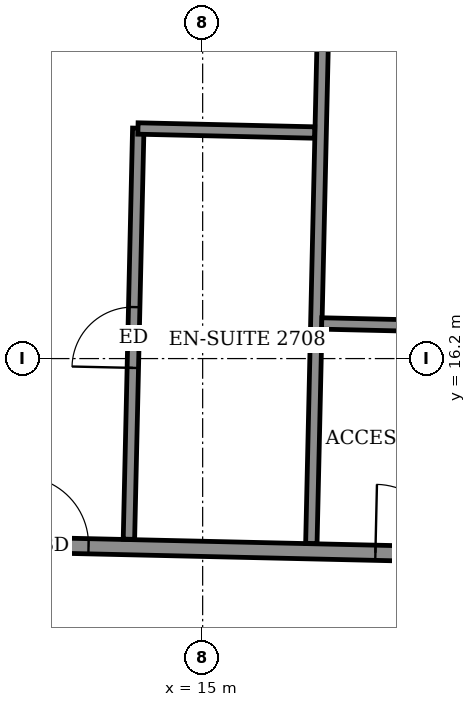
"""IFC4 building model, lengths in metres.
Left out: names, types, materials, properties, quantities, classifications, styles, units other than length and angle.
Written with IfcOpenShell. Run it as: python <this file> out.ifc"""

import sys

from ifc_helpers import new_model, si_unit, direction, frame, frame_2d, origin, place, context, subcontext, project, spatial, rectangle, extrude, element, fill, save


model = new_model("IFC4")
c1 = context("Model", 3, precision=1e-05, world=origin(), true_north=direction((0.0, 1.0)))
c2 = subcontext(c1, "Body", "Model", "MODEL_VIEW")
j1 = project(units=[si_unit("LENGTHUNIT", "METRE"), si_unit("PLANEANGLEUNIT", "RADIAN")], contexts=[c1])
p1 = place(None, origin())
s1 = spatial("IfcSite", under=j1, at=p1, CompositionType="ELEMENT")
p2 = place(p1, origin())
s2 = spatial("IfcBuilding", under=s1, at=p2, CompositionType="ELEMENT")
p3 = place(p2, frame((0.0, 0.0, 109.1)))
s3 = spatial("IfcBuildingStorey", under=s2, at=p3, CompositionType="ELEMENT", Elevation=109.1)
p4 = place(p3, frame((-26.316, 14.634, 0.0), z_axis=(0.0, 0.0, 1.0), x_axis=(0.999742734556, -0.02268181435, 0.0)))
e1 = element("IfcWall", 1, at=p4, inside=s3, PredefinedType="PARTITIONING", context=c2, shape_type="SweptSolid", body=[
    extrude(rectangle(XDim=50.708, YDim=0.2, at=frame_2d((25.354, 0.0))), origin(), (0.0, 0.0, 1.0), 3.05),
])
p5 = place(p4, frame((48.229, 0.0, 0.0)))
e2 = element("IfcOpeningElement", 2, at=p5, cuts=e1, PredefinedType="OPENING", context=c2, shape_type="SweptSolid", body=[
    extrude(rectangle(XDim=1.0, YDim=2.1, at=frame_2d((0.5, 1.05))), frame((0.0, 0.11, 0.0), z_axis=(0.0, -1.0, 0.0), x_axis=(1.0, 0.0, 0.0)), (0.0, 0.0, 1.0), 0.22),
])
p6 = place(p4, frame((43.6, 0.0, 0.0)))
e3 = element("IfcOpeningElement", 3, at=p6, cuts=e1, PredefinedType="OPENING", context=c2, shape_type="SweptSolid", body=[
    extrude(rectangle(XDim=0.9, YDim=2.1, at=frame_2d((0.45, 1.05))), frame((0.0, 0.11, 0.0), z_axis=(0.0, -1.0, 0.0), x_axis=(1.0, 0.0, 0.0)), (0.0, 0.0, 1.0), 0.22),
])
p7 = place(p4, frame((38.925, 0.0, 0.0)))
e4 = element("IfcOpeningElement", 4, at=p7, cuts=e1, PredefinedType="OPENING", context=c2, shape_type="SweptSolid", body=[
    extrude(rectangle(XDim=0.9, YDim=2.1, at=frame_2d((0.45, 1.05))), frame((0.0, 0.11, 0.0), z_axis=(0.0, -1.0, 0.0), x_axis=(1.0, 0.0, 0.0)), (0.0, 0.0, 1.0), 0.22),
])
p8 = place(p4, frame((36.9, 0.0, 0.0)))
e5 = element("IfcOpeningElement", 5, at=p8, cuts=e1, PredefinedType="OPENING", context=c2, shape_type="SweptSolid", body=[
    extrude(rectangle(XDim=0.9, YDim=2.1, at=frame_2d((0.45, 1.05))), frame((0.0, 0.11, 0.0), z_axis=(0.0, -1.0, 0.0), x_axis=(1.0, 0.0, 0.0)), (0.0, 0.0, 1.0), 0.22),
])
p9 = place(p4, frame((29.975, 0.0, 0.0)))
e6 = element("IfcOpeningElement", 6, at=p9, cuts=e1, PredefinedType="OPENING", context=c2, shape_type="SweptSolid", body=[
    extrude(rectangle(XDim=0.9, YDim=2.1, at=frame_2d((0.45, 1.05))), frame((0.0, 0.11, 0.0), z_axis=(0.0, -1.0, 0.0), x_axis=(1.0, 0.0, 0.0)), (0.0, 0.0, 1.0), 0.22),
])
p10 = place(p4, frame((27.9, 0.0, 0.0)))
e7 = element("IfcOpeningElement", 7, at=p10, cuts=e1, PredefinedType="OPENING", context=c2, shape_type="SweptSolid", body=[
    extrude(rectangle(XDim=0.9, YDim=2.1, at=frame_2d((0.45, 1.05))), frame((0.0, 0.11, 0.0), z_axis=(0.0, -1.0, 0.0), x_axis=(1.0, 0.0, 0.0)), (0.0, 0.0, 1.0), 0.22),
])
p11 = place(p4, frame((21.175, 0.0, 0.0)))
e8 = element("IfcOpeningElement", 8, at=p11, cuts=e1, PredefinedType="OPENING", context=c2, shape_type="SweptSolid", body=[
    extrude(rectangle(XDim=0.9, YDim=2.1, at=frame_2d((0.45, 1.05))), frame((0.0, 0.11, 0.0), z_axis=(0.0, -1.0, 0.0), x_axis=(1.0, 0.0, 0.0)), (0.0, 0.0, 1.0), 0.22),
])
p12 = place(p4, frame((19.25, 0.0, 0.0)))
e9 = element("IfcOpeningElement", 9, at=p12, cuts=e1, PredefinedType="OPENING", context=c2, shape_type="SweptSolid", body=[
    extrude(rectangle(XDim=0.9, YDim=2.1, at=frame_2d((0.45, 1.05))), frame((0.0, 0.11, 0.0), z_axis=(0.0, -1.0, 0.0), x_axis=(1.0, 0.0, 0.0)), (0.0, 0.0, 1.0), 0.22),
])
p13 = place(p4, frame((12.375, 0.0, 0.0)))
e10 = element("IfcOpeningElement", 10, at=p13, cuts=e1, PredefinedType="OPENING", context=c2, shape_type="SweptSolid", body=[
    extrude(rectangle(XDim=0.9, YDim=2.1, at=frame_2d((0.45, 1.05))), frame((0.0, 0.11, 0.0), z_axis=(0.0, -1.0, 0.0), x_axis=(1.0, 0.0, 0.0)), (0.0, 0.0, 1.0), 0.22),
])
p14 = place(p4, frame((10.225, 0.0, 0.0)))
e11 = element("IfcOpeningElement", 11, at=p14, cuts=e1, PredefinedType="OPENING", context=c2, shape_type="SweptSolid", body=[
    extrude(rectangle(XDim=0.9, YDim=2.1, at=frame_2d((0.45, 1.05))), frame((0.0, 0.11, 0.0), z_axis=(0.0, -1.0, 0.0), x_axis=(1.0, 0.0, 0.0)), (0.0, 0.0, 1.0), 0.22),
])
p15 = place(p4, frame((0.85, 0.0, 0.0)))
e12 = element("IfcOpeningElement", 12, at=p15, cuts=e1, PredefinedType="OPENING", context=c2, shape_type="SweptSolid", body=[
    extrude(rectangle(XDim=1.0, YDim=2.1, at=frame_2d((0.5, 1.05))), frame((0.0, 0.11, 0.0), z_axis=(0.0, -1.0, 0.0), x_axis=(1.0, 0.0, 0.0)), (0.0, 0.0, 1.0), 0.22),
])
p16 = place(p4, frame((5.55, 0.0, 0.0)))
e13 = element("IfcOpeningElement", 13, at=p16, cuts=e1, PredefinedType="OPENING", context=c2, shape_type="SweptSolid", body=[
    extrude(rectangle(XDim=0.9, YDim=2.1, at=frame_2d((0.45, 1.05))), frame((0.0, 0.11, 0.0), z_axis=(0.0, -1.0, 0.0), x_axis=(1.0, 0.0, 0.0)), (0.0, 0.0, 1.0), 0.22),
])
p17 = place(p3, frame((14.03, 13.823, 0.0), z_axis=(0.0, 0.0, 1.0), x_axis=(0.022747035861, 0.999741252705, 0.0)))
e14 = element("IfcWall", 14, at=p17, inside=s3, PredefinedType="PARTITIONING", context=c2, shape_type="SweptSolid", body=[
    extrude(rectangle(XDim=5.409, YDim=0.15, at=frame_2d((2.705, 0.0))), origin(), (0.0, 0.0, 1.0), 3.05),
])
p18 = place(p17, frame((2.255, 0.0, 0.0)))
e15 = element("IfcOpeningElement", 15, at=p18, cuts=e14, PredefinedType="OPENING", context=c2, shape_type="SweptSolid", body=[
    extrude(rectangle(XDim=0.8, YDim=2.1, at=frame_2d((0.4, 1.05))), frame((0.0, 0.085, 0.0), z_axis=(0.0, -1.0, 0.0), x_axis=(1.0, 0.0, 0.0)), (0.0, 0.0, 1.0), 0.17),
])
p19 = place(p3, frame((16.43, 13.768, 0.0), z_axis=(0.0, 0.0, 1.0), x_axis=(0.022624509406, 0.999744033028, 0.0)))
e16 = element("IfcWall", 16, at=p19, inside=s3, PredefinedType="PARTITIONING", context=c2, shape_type="SweptSolid", body=[
    extrude(rectangle(XDim=11.676, YDim=0.15, at=frame_2d((5.838, 0.0))), origin(), (0.0, 0.0, 1.0), 2.55),
])
p20 = place(p3, frame((16.566, 16.662, 0.0), z_axis=(0.0, 0.0, 1.0), x_axis=(0.999735358199, -0.023004642294, 0.0)))
e17 = element("IfcWall", 17, at=p20, inside=s3, PredefinedType="PARTITIONING", context=c2, shape_type="SweptSolid", body=[
    extrude(rectangle(XDim=2.526, YDim=0.15, at=frame_2d((1.263, 0.0))), origin(), (0.0, 0.0, 1.0), 3.05),
])
p21 = place(p3, frame((14.149, 19.227, 0.0), z_axis=(0.0, 0.0, 1.0), x_axis=(0.999740260747, -0.02279059109, 0.0)))
e18 = element("IfcWall", 18, at=p21, inside=s3, PredefinedType="PARTITIONING", context=c2, shape_type="SweptSolid", body=[
    extrude(rectangle(XDim=2.324, YDim=0.15, at=frame_2d((1.162, 0.0))), origin(), (0.0, 0.0, 1.0), 3.05),
])
p22 = place(p6, origin())
e19 = element("IfcDoor", 19, at=p22, inside=s3, OperationType="SINGLE_SWING_RIGHT", PredefinedType="DOOR", context=c2, shape_type="SweptSolid", body=[
    extrude(rectangle(XDim=0.9, YDim=2.1, at=frame_2d((0.45, 1.05))), frame((0.0, 0.025, 0.0), z_axis=(0.0, -1.0, 0.0), x_axis=(1.0, 0.0, 0.0)), (0.0, 0.0, 1.0), 0.05),
])
fill(e3, e19)
p23 = place(p7, origin())
e20 = element("IfcDoor", 20, at=p23, inside=s3, OperationType="SINGLE_SWING_RIGHT", PredefinedType="DOOR", context=c2, shape_type="SweptSolid", body=[
    extrude(rectangle(XDim=0.9, YDim=2.1, at=frame_2d((0.45, 1.05))), frame((0.0, 0.025, 0.0), z_axis=(0.0, -1.0, 0.0), x_axis=(1.0, 0.0, 0.0)), (0.0, 0.0, 1.0), 0.05),
])
fill(e4, e20)
p24 = place(p18, origin())
e21 = element("IfcDoor", 21, at=p24, inside=s3, OperationType="SINGLE_SWING_RIGHT", PredefinedType="DOOR", context=c2, shape_type="SweptSolid", body=[
    extrude(rectangle(XDim=0.8, YDim=2.1, at=frame_2d((0.4, 1.05))), frame((0.0, 0.025, 0.0), z_axis=(0.0, -1.0, 0.0), x_axis=(1.0, 0.0, 0.0)), (0.0, 0.0, 1.0), 0.05),
])
fill(e15, e21)
save(model, sys.argv[1])
